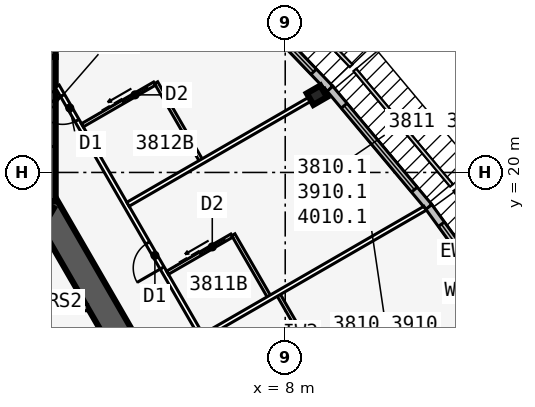
"""IFC4 building model, lengths in metres.
Left out: names, types, materials, properties, quantities, classifications, styles, units other than length and angle.
Written with IfcOpenShell. Run it as: python <this file> out.ifc"""

import sys

from ifc_helpers import new_model, si_unit, direction, frame, frame_2d, origin, origin_2d, place, context, subcontext, project, spatial, rectangle, i_section, extrude, element, fill, save


model = new_model("IFC4")
c1 = context("Model", 3, precision=1e-05, world=origin(), true_north=direction((0.0, 1.0)))
c2 = subcontext(c1, "Body", "Model", "MODEL_VIEW")
j1 = project(units=[si_unit("LENGTHUNIT", "METRE"), si_unit("PLANEANGLEUNIT", "RADIAN")], contexts=[c1])
p1 = place(None, origin())
s1 = spatial("IfcSite", under=j1, at=p1, CompositionType="ELEMENT")
p2 = place(p1, origin())
s2 = spatial("IfcBuilding", under=s1, at=p2, CompositionType="ELEMENT")
p3 = place(p2, frame((0.0, 0.0, 145.3)))
s3 = spatial("IfcBuildingStorey", under=s2, at=p3, CompositionType="ELEMENT", Elevation=145.3)
p4 = place(p3, frame((16.5, -9.526, 0.0), z_axis=(0.0, 0.0, 1.0), x_axis=(-0.499999749417, 0.866025548458, 0.0)))
e1 = element("IfcWall", 1, at=p4, inside=s3, PredefinedType="SHEAR", context=c2, shape_type="SweptSolid", body=[
    extrude(rectangle(XDim=33.0, YDim=0.9, at=frame_2d((16.5, 0.0))), origin(), (0.0, 0.0, 1.0), 3.4),
])
p5 = place(p4, frame((14.15, 0.0, 0.0)))
e2 = element("IfcOpeningElement", 2, at=p5, cuts=e1, PredefinedType="OPENING", context=c2, shape_type="SweptSolid", body=[
    extrude(rectangle(XDim=1.8, YDim=2.13, at=frame_2d((0.9, 1.065))), frame((0.0, 0.46, 0.0), z_axis=(0.0, -1.0, 0.0), x_axis=(1.0, 0.0, 0.0)), (0.0, 0.0, 1.0), 0.92),
])
p6 = place(p4, frame((12.6, 0.0, 0.0)))
e3 = element("IfcOpeningElement", 3, at=p6, cuts=e1, PredefinedType="OPENING", context=c2, shape_type="SweptSolid", body=[
    extrude(rectangle(XDim=1.0, YDim=2.13, at=frame_2d((0.5, 1.065))), frame((0.0, 0.46, 0.0), z_axis=(0.0, -1.0, 0.0), x_axis=(1.0, 0.0, 0.0)), (0.0, 0.0, 1.0), 0.92),
])
p7 = place(p3, frame((0.0, 19.052, 0.0), z_axis=(0.0, 0.0, 1.0), x_axis=(-0.499999749417, -0.866025548458, 0.0)))
e4 = element("IfcWall", 4, at=p7, inside=s3, PredefinedType="SHEAR", context=c2, shape_type="SweptSolid", body=[
    extrude(rectangle(XDim=33.0, YDim=0.9, at=frame_2d((16.5, 0.0))), origin(), (0.0, 0.0, 1.0), 3.4),
])
p8 = place(p7, frame((14.15, 0.0, 0.0)))
e5 = element("IfcOpeningElement", 5, at=p8, cuts=e4, PredefinedType="OPENING", context=c2, shape_type="SweptSolid", body=[
    extrude(rectangle(XDim=1.8, YDim=2.13, at=frame_2d((0.9, 1.065))), frame((0.0, 0.46, 0.0), z_axis=(0.0, -1.0, 0.0), x_axis=(1.0, 0.0, 0.0)), (0.0, 0.0, 1.0), 0.92),
])
p9 = place(p7, frame((12.6, 0.0, 0.0)))
e6 = element("IfcOpeningElement", 6, at=p9, cuts=e4, PredefinedType="OPENING", context=c2, shape_type="SweptSolid", body=[
    extrude(rectangle(XDim=1.0, YDim=2.13, at=frame_2d((0.5, 1.065))), frame((0.0, 0.46, 0.0), z_axis=(0.0, -1.0, 0.0), x_axis=(1.0, 0.0, 0.0)), (0.0, 0.0, 1.0), 0.92),
])
p10 = place(p3, frame((0.0, 19.052, 0.0), z_axis=(0.0, 0.0, 1.0), x_axis=(0.0, 1.0, 0.0)))
e7 = element("IfcWall", 7, at=p10, inside=s3, PredefinedType="SHEAR", context=c2, shape_type="SweptSolid", body=[
    extrude(rectangle(XDim=4.746, YDim=0.9, at=frame_2d((2.373, 0.0))), origin(), (0.0, 0.0, 1.0), 3.4),
])
p11 = place(p10, frame((1.8, 0.0, 0.0)))
e8 = element("IfcOpeningElement", 8, at=p11, cuts=e7, PredefinedType="OPENING", context=c2, shape_type="SweptSolid", body=[
    extrude(rectangle(XDim=1.8, YDim=2.13, at=frame_2d((0.9, 1.065))), frame((0.0, 0.46, 0.0), z_axis=(0.0, -1.0, 0.0), x_axis=(1.0, 0.0, 0.0)), (0.0, 0.0, 1.0), 0.92),
])
p12 = place(p3, frame((0.0, 23.799, 0.0), z_axis=(0.0, 0.0, 1.0), x_axis=(0.0, 1.0, 0.0)))
e9 = element("IfcWall", 9, at=p12, inside=s3, PredefinedType="SHEAR", context=c2, shape_type="SweptSolid", body=[
    extrude(rectangle(XDim=1.155, YDim=0.9, at=frame_2d((0.577, 0.0))), origin(), (0.0, 0.0, 1.0), 3.4),
])
p13 = place(p3, frame((9.041, 22.541, 0.0), z_axis=(0.0, 0.0, 1.0), x_axis=(-0.5, 0.866025403784, 0.0)))
e10 = element("IfcColumn", 10, at=p13, inside=s3, PredefinedType="COLUMN", context=c2, shape_type="SweptSolid", body=[
    extrude(i_section(OverallWidth=0.437, OverallDepth=0.513, WebThickness=0.061, FlangeThickness=0.097, at=origin_2d()), origin(), (0.0, 0.0, 1.0), 3.4),
])
p14 = place(p3, frame((15.672, 14.807, 0.0), z_axis=(0.0, 0.0, 1.0), x_axis=(-0.587669188412, 0.809101307001, 0.0)))
e11 = element("IfcWall", 11, at=p14, inside=s3, PredefinedType="STANDARD", context=c2, shape_type="SweptSolid", body=[
    extrude(rectangle(XDim=5.028, YDim=0.25, at=frame_2d((2.514, 0.0))), origin(), (0.0, 0.0, 1.0), 3.235),
])
p15 = place(p14, frame((0.714, 0.0, 0.45)))
e12 = element("IfcOpeningElement", 12, at=p15, cuts=e11, PredefinedType="OPENING", context=c2, shape_type="SweptSolid", body=[
    extrude(rectangle(XDim=3.6, YDim=2.4, at=frame_2d((1.8, 1.2))), frame((0.0, 0.135, 0.0), z_axis=(0.0, -1.0, 0.0), x_axis=(1.0, 0.0, 0.0)), (0.0, 0.0, 1.0), 0.27),
])
p16 = place(p3, frame((12.723, 18.868, 0.0), z_axis=(0.0, 0.0, 1.0), x_axis=(-0.641810386606, 0.766863369607, 0.0)))
e13 = element("IfcWall", 13, at=p16, inside=s3, PredefinedType="STANDARD", context=c2, shape_type="SweptSolid", body=[
    extrude(rectangle(XDim=5.076, YDim=0.25, at=frame_2d((2.538, 0.0))), origin(), (0.0, 0.0, 1.0), 3.235),
])
p17 = place(p16, frame((0.738, 0.0, 0.45)))
e14 = element("IfcOpeningElement", 14, at=p17, cuts=e13, PredefinedType="OPENING", context=c2, shape_type="SweptSolid", body=[
    extrude(rectangle(XDim=3.6, YDim=2.4, at=frame_2d((1.8, 1.2))), frame((0.0, 0.135, 0.0), z_axis=(0.0, -1.0, 0.0), x_axis=(1.0, 0.0, 0.0)), (0.0, 0.0, 1.0), 0.27),
])
p18 = place(p3, frame((9.471, 22.754, 0.0), z_axis=(0.0, 0.0, 1.0), x_axis=(-0.691719937936, 0.722165858693, 0.0)))
e15 = element("IfcWall", 15, at=p18, inside=s3, PredefinedType="STANDARD", context=c2, shape_type="SweptSolid", body=[
    extrude(rectangle(XDim=5.148, YDim=0.25, at=frame_2d((2.574, 0.0))), origin(), (0.0, 0.0, 1.0), 3.235),
])
p19 = place(p18, frame((0.774, 0.0, 0.45)))
e16 = element("IfcOpeningElement", 16, at=p19, cuts=e15, PredefinedType="OPENING", context=c2, shape_type="SweptSolid", body=[
    extrude(rectangle(XDim=3.6, YDim=2.4, at=frame_2d((1.8, 1.2))), frame((0.0, 0.135, 0.0), z_axis=(0.0, -1.0, 0.0), x_axis=(1.0, 0.0, 0.0)), (0.0, 0.0, 1.0), 0.27),
])
p20 = place(p3, frame((20.027, -10.985, 0.0), z_axis=(0.0, 0.0, 1.0), x_axis=(-0.500001677587, 0.866024435227, 0.0)))
e17 = element("IfcWall", 17, at=p20, inside=s3, PredefinedType="PARTITIONING", context=c2, shape_type="SweptSolid", body=[
    extrude(rectangle(XDim=39.054, YDim=0.15, at=frame_2d((19.527, 0.0))), origin(), (0.0, 0.0, 1.0), 3.235),
])
p21 = place(p20, frame((0.352, 0.0, 0.0)))
e18 = element("IfcOpeningElement", 18, at=p21, cuts=e17, PredefinedType="OPENING", context=c2, shape_type="SweptSolid", body=[
    extrude(rectangle(XDim=0.95, YDim=2.13, at=frame_2d((0.475, 1.065))), frame((0.0, 0.085, 0.0), z_axis=(0.0, -1.0, 0.0), x_axis=(1.0, 0.0, 0.0)), (0.0, 0.0, 1.0), 0.17),
])
p22 = place(p20, frame((6.552, 0.0, 0.0)))
e19 = element("IfcOpeningElement", 19, at=p22, cuts=e17, PredefinedType="OPENING", context=c2, shape_type="SweptSolid", body=[
    extrude(rectangle(XDim=0.95, YDim=2.13, at=frame_2d((0.475, 1.065))), frame((0.0, 0.085, 0.0), z_axis=(0.0, -1.0, 0.0), x_axis=(1.0, 0.0, 0.0)), (0.0, 0.0, 1.0), 0.17),
])
p23 = place(p20, frame((17.152, 0.0, 0.0)))
e20 = element("IfcOpeningElement", 20, at=p23, cuts=e17, PredefinedType="OPENING", context=c2, shape_type="SweptSolid", body=[
    extrude(rectangle(XDim=0.95, YDim=2.13, at=frame_2d((0.475, 1.065))), frame((0.0, 0.085, 0.0), z_axis=(0.0, -1.0, 0.0), x_axis=(1.0, 0.0, 0.0)), (0.0, 0.0, 1.0), 0.17),
])
p24 = place(p20, frame((21.552, 0.0, 0.0)))
e21 = element("IfcOpeningElement", 21, at=p24, cuts=e17, PredefinedType="OPENING", context=c2, shape_type="SweptSolid", body=[
    extrude(rectangle(XDim=0.95, YDim=2.13, at=frame_2d((0.475, 1.065))), frame((0.0, 0.085, 0.0), z_axis=(0.0, -1.0, 0.0), x_axis=(1.0, 0.0, 0.0)), (0.0, 0.0, 1.0), 0.17),
])
p25 = place(p20, frame((32.152, 0.0, 0.0)))
e22 = element("IfcOpeningElement", 22, at=p25, cuts=e17, PredefinedType="OPENING", context=c2, shape_type="SweptSolid", body=[
    extrude(rectangle(XDim=0.95, YDim=2.13, at=frame_2d((0.475, 1.065))), frame((0.0, 0.085, 0.0), z_axis=(0.0, -1.0, 0.0), x_axis=(1.0, 0.0, 0.0)), (0.0, 0.0, 1.0), 0.17),
])
p26 = place(p20, frame((37.752, 0.0, 0.0)))
e23 = element("IfcOpeningElement", 23, at=p26, cuts=e17, PredefinedType="OPENING", context=c2, shape_type="SweptSolid", body=[
    extrude(rectangle(XDim=0.95, YDim=2.13, at=frame_2d((0.475, 1.065))), frame((0.0, 0.085, 0.0), z_axis=(0.0, -1.0, 0.0), x_axis=(1.0, 0.0, 0.0)), (0.0, 0.0, 1.0), 0.17),
])
p27 = place(p3, frame((5.329, 14.623, 0.0), z_axis=(0.0, 0.0, 1.0), x_axis=(0.866011723728, 0.500023693804, 0.0)))
e24 = element("IfcWall", 24, at=p27, inside=s3, PredefinedType="PARTITIONING", context=c2, shape_type="SweptSolid", body=[
    extrude(rectangle(XDim=8.395, YDim=0.15, at=frame_2d((4.198, 0.0))), origin(), (0.0, 0.0, 1.0), 2.389),
])
p28 = place(p3, frame((2.829, 18.954, 0.0), z_axis=(0.0, 0.0, 1.0), x_axis=(0.866015739374, 0.500016738876, 0.0)))
e25 = element("IfcWall", 25, at=p28, inside=s3, PredefinedType="PARTITIONING", context=c2, shape_type="SweptSolid", body=[
    extrude(rectangle(XDim=7.516, YDim=0.15, at=frame_2d((3.758, 0.0))), origin(), (0.0, 0.0, 1.0), 2.389),
])
p29 = place(p3, frame((9.253, 13.425, 0.0), z_axis=(0.0, 0.0, 1.0), x_axis=(-0.499990139034, 0.866031096941, 0.0)))
e26 = element("IfcWall", 26, at=p29, inside=s3, PredefinedType="PLUMBINGWALL", context=c2, shape_type="SweptSolid", body=[
    extrude(rectangle(XDim=3.0, YDim=0.12, at=frame_2d((1.5, 0.0))), origin(), (0.0, 0.0, 1.0), 3.235),
])
p30 = place(p3, frame((7.493, 15.873, 0.0), z_axis=(0.0, 0.0, 1.0), x_axis=(-0.499957262057, 0.866050077142, 0.0)))
e27 = element("IfcWall", 27, at=p30, inside=s3, PredefinedType="PLUMBINGWALL", context=c2, shape_type="SweptSolid", body=[
    extrude(rectangle(XDim=2.4, YDim=0.12, at=frame_2d((1.2, 0.0))), origin(), (0.0, 0.0, 1.0), 3.235),
])
p31 = place(p3, frame((4.128, 16.702, 0.0), z_axis=(0.0, 0.0, 1.0), x_axis=(0.866048967903, 0.499959183527, 0.0)))
e28 = element("IfcWall", 28, at=p31, inside=s3, PredefinedType="PLUMBINGWALL", context=c2, shape_type="SweptSolid", body=[
    extrude(rectangle(XDim=2.44, YDim=0.12, at=frame_2d((1.22, 0.0))), origin(), (0.0, 0.0, 1.0), 3.235),
])
p32 = place(p31, frame((1.25, 0.0, 0.0)))
e29 = element("IfcOpeningElement", 29, at=p32, cuts=e28, PredefinedType="OPENING", context=c2, shape_type="SweptSolid", body=[
    extrude(rectangle(XDim=0.9, YDim=2.13, at=frame_2d((0.45, 1.065))), frame((0.0, 0.07, 0.0), z_axis=(0.0, -1.0, 0.0), x_axis=(1.0, 0.0, 0.0)), (0.0, 0.0, 1.0), 0.14),
])
p33 = place(p3, frame((5.253, 20.354, 0.0), z_axis=(0.0, 0.0, 1.0), x_axis=(-0.499990139034, 0.866031096941, 0.0)))
e30 = element("IfcWall", 30, at=p33, inside=s3, PredefinedType="PLUMBINGWALL", context=c2, shape_type="SweptSolid", body=[
    extrude(rectangle(XDim=3.0, YDim=0.12, at=frame_2d((1.5, 0.0))), origin(), (0.0, 0.0, 1.0), 3.235),
])
p34 = place(p3, frame((1.329, 21.552, 0.0), z_axis=(0.0, 0.0, 1.0), x_axis=(0.865997131366, 0.500048966069, 0.0)))
e31 = element("IfcWall", 31, at=p34, inside=s3, PredefinedType="PLUMBINGWALL", context=c2, shape_type="SweptSolid", body=[
    extrude(rectangle(XDim=2.74, YDim=0.12, at=frame_2d((1.37, 0.0))), origin(), (0.0, 0.0, 1.0), 3.235),
])
p35 = place(p34, frame((1.55, 0.0, 0.0)))
e32 = element("IfcOpeningElement", 32, at=p35, cuts=e31, PredefinedType="OPENING", context=c2, shape_type="SweptSolid", body=[
    extrude(rectangle(XDim=0.9, YDim=2.13, at=frame_2d((0.45, 1.065))), frame((0.0, 0.07, 0.0), z_axis=(0.0, -1.0, 0.0), x_axis=(1.0, 0.0, 0.0)), (0.0, 0.0, 1.0), 0.14),
])
p36 = place(p3, frame((-1.501, 15.552, 0.0), z_axis=(0.0, 0.0, 1.0), x_axis=(1.0, 0.0, 0.0)))
e33 = element("IfcWall", 33, at=p36, inside=s3, PredefinedType="SOLIDWALL", context=c2, shape_type="SweptSolid", body=[
    extrude(rectangle(XDim=3.002, YDim=0.2, at=frame_2d((1.501, 0.0))), origin(), (0.0, 0.0, 1.0), 3.235),
])
p37 = place(p15, origin())
e34 = element("IfcWindow", 34, at=p37, inside=s3, PartitioningType="SINGLE_PANEL", PredefinedType="WINDOW", context=c2, shape_type="SweptSolid", body=[
    extrude(rectangle(XDim=3.6, YDim=2.4, at=frame_2d((1.8, 1.2))), frame((0.0, 0.03, 0.0), z_axis=(0.0, -1.0, 0.0), x_axis=(1.0, 0.0, 0.0)), (0.0, 0.0, 1.0), 0.06),
])
fill(e12, e34)
p38 = place(p17, origin())
e35 = element("IfcWindow", 35, at=p38, inside=s3, PartitioningType="SINGLE_PANEL", PredefinedType="WINDOW", context=c2, shape_type="SweptSolid", body=[
    extrude(rectangle(XDim=3.6, YDim=2.4, at=frame_2d((1.8, 1.2))), frame((0.0, 0.03, 0.0), z_axis=(0.0, -1.0, 0.0), x_axis=(1.0, 0.0, 0.0)), (0.0, 0.0, 1.0), 0.06),
])
fill(e14, e35)
p39 = place(p19, origin())
e36 = element("IfcWindow", 36, at=p39, inside=s3, PartitioningType="SINGLE_PANEL", PredefinedType="WINDOW", context=c2, shape_type="SweptSolid", body=[
    extrude(rectangle(XDim=3.6, YDim=2.4, at=frame_2d((1.8, 1.2))), frame((0.0, 0.03, 0.0), z_axis=(0.0, -1.0, 0.0), x_axis=(1.0, 0.0, 0.0)), (0.0, 0.0, 1.0), 0.06),
])
fill(e16, e36)
p40 = place(p32, origin())
e37 = element("IfcDoor", 37, at=p40, inside=s3, OperationType="SLIDING_TO_LEFT", PredefinedType="DOOR", context=c2, shape_type="SweptSolid", body=[
    extrude(rectangle(XDim=0.9, YDim=2.13, at=frame_2d((0.45, 1.065))), frame((0.0, 0.025, 0.0), z_axis=(0.0, -1.0, 0.0), x_axis=(1.0, 0.0, 0.0)), (0.0, 0.0, 1.0), 0.05),
])
fill(e29, e37)
p41 = place(p25, origin())
e38 = element("IfcDoor", 38, at=p41, inside=s3, OperationType="SINGLE_SWING_LEFT", PredefinedType="DOOR", context=c2, shape_type="SweptSolid", body=[
    extrude(rectangle(XDim=0.95, YDim=2.13, at=frame_2d((0.475, 1.065))), frame((0.0, 0.025, 0.0), z_axis=(0.0, -1.0, 0.0), x_axis=(1.0, 0.0, 0.0)), (0.0, 0.0, 1.0), 0.05),
])
fill(e22, e38)
p42 = place(p35, origin())
e39 = element("IfcDoor", 39, at=p42, inside=s3, OperationType="SLIDING_TO_LEFT", PredefinedType="DOOR", context=c2, shape_type="SweptSolid", body=[
    extrude(rectangle(XDim=0.9, YDim=2.13, at=frame_2d((0.45, 1.065))), frame((0.0, 0.025, 0.0), z_axis=(0.0, -1.0, 0.0), x_axis=(1.0, 0.0, 0.0)), (0.0, 0.0, 1.0), 0.05),
])
fill(e32, e39)
p43 = place(p26, origin())
e40 = element("IfcDoor", 40, at=p43, inside=s3, OperationType="SINGLE_SWING_RIGHT", PredefinedType="DOOR", context=c2, shape_type="SweptSolid", body=[
    extrude(rectangle(XDim=0.95, YDim=2.13, at=frame_2d((0.475, 1.065))), frame((0.0, 0.025, 0.0), z_axis=(0.0, -1.0, 0.0), x_axis=(1.0, 0.0, 0.0)), (0.0, 0.0, 1.0), 0.05),
])
fill(e23, e40)
save(model, sys.argv[1])
